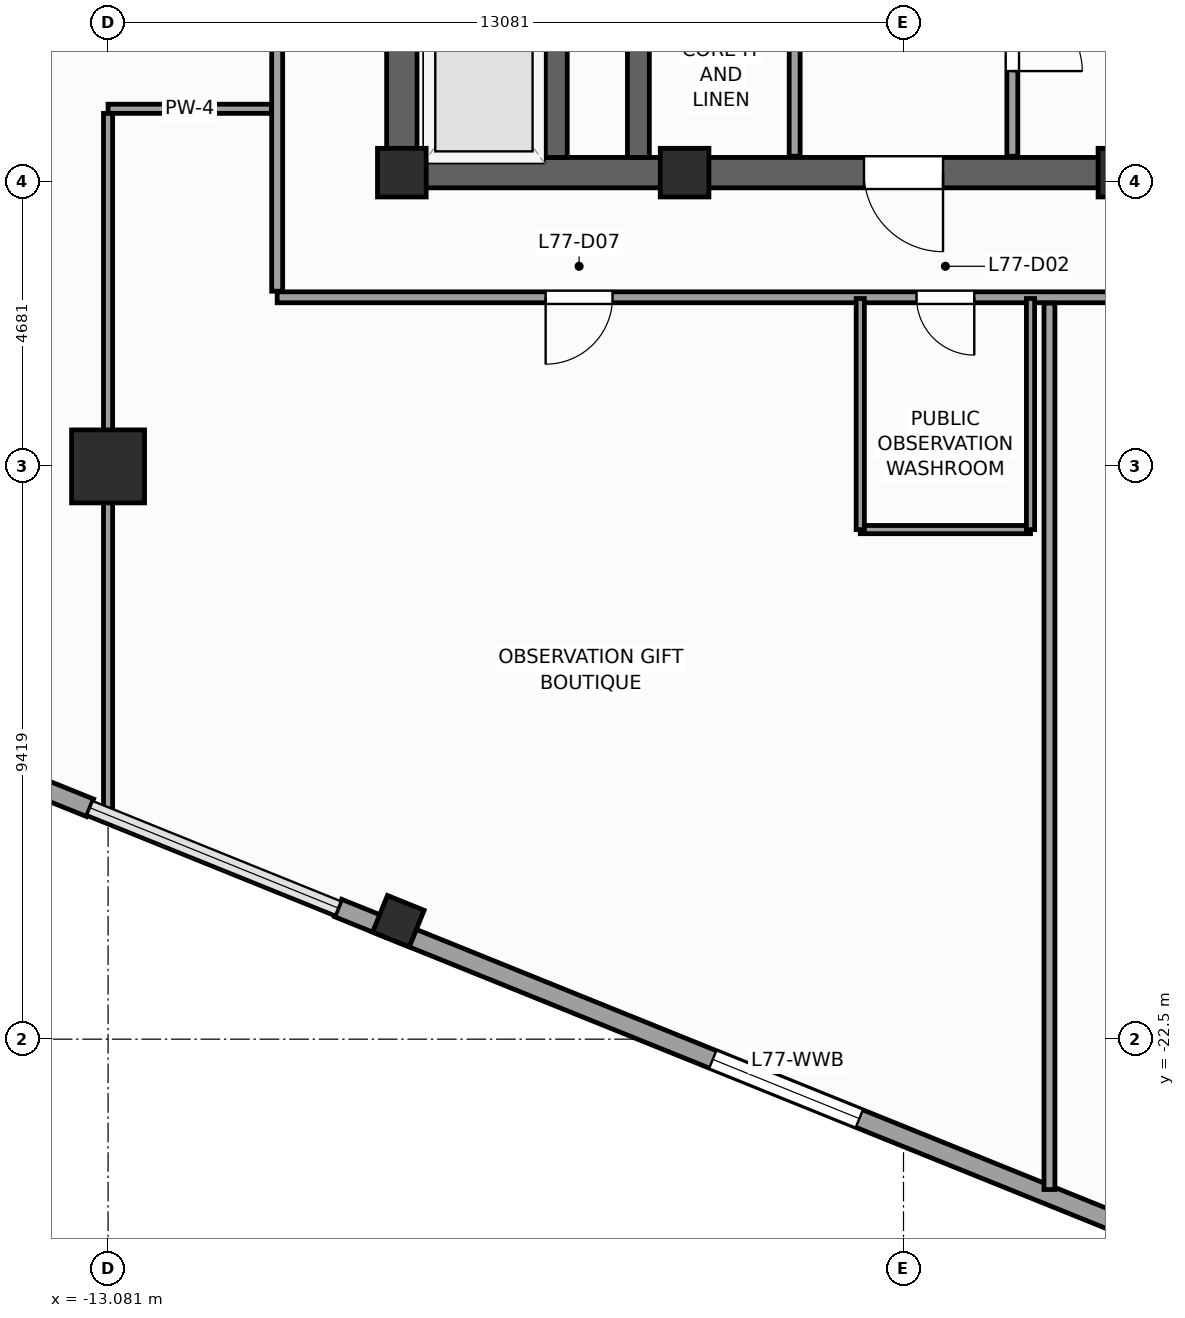
"""IFC4 building model, lengths in metres.
Left out: names, types, materials, properties, quantities, classifications, styles, units other than length and angle.
Written with IfcOpenShell. Run it as: python <this file> out.ifc"""

import sys

from ifc_helpers import new_model, si_unit, direction, frame, frame_2d, origin, origin_2d, place, context, subcontext, project, spatial, rectangle, extrude, source, transform, mapped, element, fill, save


model = new_model("IFC4")
c1 = context("Model", 3, precision=1e-05, world=origin(), true_north=direction((0.0, 1.0)))
c2 = subcontext(c1, "Body", "Model", "MODEL_VIEW")
j1 = project(units=[si_unit("LENGTHUNIT", "METRE"), si_unit("PLANEANGLEUNIT", "RADIAN")], contexts=[c1])
p1 = place(None, origin())
s1 = spatial("IfcSite", under=j1, at=p1, CompositionType="ELEMENT")
p2 = place(p1, origin())
s2 = spatial("IfcBuilding", under=s1, at=p2, CompositionType="ELEMENT")
p3 = place(p2, frame((0.0, 0.0, 312.0)))
s3 = spatial("IfcBuildingStorey", under=s2, at=p3, CompositionType="ELEMENT", Elevation=312.0)
p4 = place(p3, frame((-8.5, -8.25, 0.0), z_axis=(0.0, 0.0, 1.0), x_axis=(1.0, 0.0, 0.0)))
e1 = element("IfcWall", 1, at=p4, inside=s3, PredefinedType="SHEAR", context=c2, shape_type="SweptSolid", body=[
    extrude(rectangle(XDim=17.0, YDim=0.5, at=frame_2d((8.5, 0.0))), origin(), (0.0, 0.0, 1.0), 4.8),
])
p5 = place(p4, frame((7.85, 0.0, 0.0)))
e2 = element("IfcOpeningElement", 2, at=p5, cuts=e1, PredefinedType="OPENING", context=c2, shape_type="SweptSolid", body=[
    extrude(rectangle(XDim=1.3, YDim=2.2, at=frame_2d((0.65, 1.1))), frame((0.0, 0.26, 0.0), z_axis=(0.0, -1.0, 0.0), x_axis=(1.0, 0.0, 0.0)), (0.0, 0.0, 1.0), 0.52),
])
p6 = place(p3, frame((-8.25, -8.0, 0.0), z_axis=(0.0, 0.0, 1.0), x_axis=(0.0, 1.0, 0.0)))
e3 = element("IfcWall", 3, at=p6, inside=s3, PredefinedType="SHEAR", context=c2, shape_type="SweptSolid", body=[
    extrude(rectangle(XDim=16.0, YDim=0.5, at=frame_2d((8.0, 0.0))), origin(), (0.0, 0.0, 1.0), 4.8),
])
p7 = place(p6, frame((4.69, 0.0, 0.0)))
e4 = element("IfcOpeningElement", 4, at=p7, cuts=e3, PredefinedType="OPENING", context=c2, shape_type="SweptSolid", body=[
    extrude(rectangle(XDim=1.3, YDim=2.2, at=frame_2d((0.65, 1.1))), frame((0.0, 0.26, 0.0), z_axis=(0.0, -1.0, 0.0), x_axis=(1.0, 0.0, 0.0)), (0.0, 0.0, 1.0), 0.52),
])
p8 = place(p3, frame((-4.36, -8.0, 0.0), z_axis=(0.0, 0.0, 1.0), x_axis=(0.0, 1.0, 0.0)))
e5 = element("IfcWall", 5, at=p8, inside=s3, PredefinedType="SHEAR", context=c2, shape_type="SweptSolid", body=[
    extrude(rectangle(XDim=16.0, YDim=0.36, at=frame_2d((8.0, 0.0))), origin(), (0.0, 0.0, 1.0), 4.8),
])
p9 = place(p3, frame((-5.71, -8.0, 0.0), z_axis=(0.0, 0.0, 1.0), x_axis=(0.0, 1.0, 0.0)))
e6 = element("IfcWall", 6, at=p9, inside=s3, PredefinedType="SHEAR", context=c2, shape_type="SweptSolid", body=[
    extrude(rectangle(XDim=2.54, YDim=0.36, at=frame_2d((1.27, 0.0))), origin(), (0.0, 0.0, 1.0), 4.8),
])
m1 = source(origin(), c2, "Body", "SweptSolid", [
    extrude(rectangle(XDim=0.8, YDim=0.8, at=origin_2d()), origin(), (0.0, 0.0, 1.0), 4.8),
])
for number, where, z_axis, x_axis in (
    (7, (-8.25, -8.25, 0.0), (0.0, 0.0, 1.0), (1.0, 0.0, 0.0)),
    (8, (-3.6, -8.25, 0.0), (0.0, 0.0, 1.0), (1.0, 0.0, 0.0)),
    (9, (3.6, -8.25, 0.0), (0.0, 0.0, 1.0), (1.0, 0.0, 0.0)),
):
    element("IfcColumn", number, at=place(p3, frame(where, z_axis=z_axis, x_axis=x_axis)), inside=s3, PredefinedType="PILASTER", context=c2, shape_type="MappedRepresentation", body=[
        mapped(m1, transform((0.0, 0.0, 0.0), scale=1.0)),
    ])
m2 = source(origin(), c2, "Body", "SweptSolid", [
    extrude(rectangle(XDim=1.2, YDim=1.2, at=origin_2d()), origin(), (0.0, 0.0, 1.0), 4.8),
])
p10 = place(p3, frame((-13.081, -13.081, 0.0), z_axis=(0.0, 0.0, 1.0), x_axis=(1.0, 0.0, 0.0)))
e10 = element("IfcColumn", 10, at=p10, inside=s3, PredefinedType="COLUMN", context=c2, shape_type="MappedRepresentation", body=[
    mapped(m2, transform((0.0, 0.0, 0.0), scale=1.0)),
])
m3 = source(origin(), c2, "Body", "SweptSolid", [
    extrude(rectangle(XDim=0.65, YDim=0.65, at=origin_2d()), origin(), (0.0, 0.0, 1.0), 4.8),
])
p11 = place(p3, frame((-8.307, -20.56, 0.0), z_axis=(0.0, 0.0, 1.0), x_axis=(0.374606593416, 0.927183854567, 0.0)))
e11 = element("IfcColumn", 11, at=p11, inside=s3, PredefinedType="COLUMN", context=c2, shape_type="MappedRepresentation", body=[
    mapped(m3, transform((0.0, 0.0, 0.0), scale=1.0)),
])
p12 = place(p3, frame((-23.813, -14.479, 0.0), z_axis=(0.0, 0.0, 1.0), x_axis=(0.927178527544, -0.374619777991, 0.0)))
e12 = element("IfcWall", 12, at=p12, inside=s3, PredefinedType="STANDARD", context=c2, shape_type="SweptSolid", body=[
    extrude(rectangle(XDim=11.255, YDim=0.31, at=frame_2d((5.627, 0.0))), origin(), (0.0, 0.0, 1.0), 3.95),
])
p13 = place(p3, frame((-9.298, -20.343, 0.0), z_axis=(0.0, 0.0, 1.0), x_axis=(0.927183654967, -0.374607087443, 0.0)))
e13 = element("IfcWall", 13, at=p13, inside=s3, PredefinedType="STANDARD", context=c2, shape_type="SweptSolid", body=[
    extrude(rectangle(XDim=17.655, YDim=0.31, at=frame_2d((8.828, 0.0))), origin(), (0.0, 0.0, 1.0), 3.95),
])
p14 = place(p13, frame((6.645, 0.0, 0.65)))
e14 = element("IfcOpeningElement", 14, at=p14, cuts=e13, PredefinedType="OPENING", context=c2, shape_type="SweptSolid", body=[
    extrude(rectangle(XDim=2.6, YDim=3.0, at=frame_2d((1.3, 1.5))), frame((0.0, 0.165, 0.0), z_axis=(0.0, -1.0, 0.0), x_axis=(1.0, 0.0, 0.0)), (0.0, 0.0, 1.0), 0.33),
])
p15 = place(p3, frame((-1.79, -7.98, 0.0), z_axis=(0.0, 0.0, 1.0), x_axis=(0.0, 1.0, 0.0)))
e15 = element("IfcWall", 15, at=p15, inside=s3, PredefinedType="PARTITIONING", context=c2, shape_type="SweptSolid", body=[
    extrude(rectangle(XDim=12.38, YDim=0.18, at=frame_2d((6.19, 0.0))), origin(), (0.0, 0.0, 1.0), 4.55),
])
p16 = place(p15, frame((8.8, 0.0, 0.0)))
e16 = element("IfcOpeningElement", 16, at=p16, cuts=e15, PredefinedType="OPENING", context=c2, shape_type="SweptSolid", body=[
    extrude(rectangle(XDim=1.1, YDim=2.2, at=frame_2d((0.55, 1.1))), frame((0.0, 0.1, 0.0), z_axis=(0.0, -1.0, 0.0), x_axis=(1.0, 0.0, 0.0)), (0.0, 0.0, 1.0), 0.2),
])
p17 = place(p15, frame((10.86, 0.0, 0.0)))
e17 = element("IfcOpeningElement", 17, at=p17, cuts=e15, PredefinedType="OPENING", context=c2, shape_type="SweptSolid", body=[
    extrude(rectangle(XDim=1.1, YDim=2.2, at=frame_2d((0.55, 1.1))), frame((0.0, 0.1, 0.0), z_axis=(0.0, -1.0, 0.0), x_axis=(1.0, 0.0, 0.0)), (0.0, 0.0, 1.0), 0.2),
])
p18 = place(p15, frame((3.5, 0.0, 0.0)))
e18 = element("IfcOpeningElement", 18, at=p18, cuts=e15, PredefinedType="OPENING", context=c2, shape_type="SweptSolid", body=[
    extrude(rectangle(XDim=1.15, YDim=2.25, at=frame_2d((0.575, 1.125))), frame((0.0, 0.1, 0.0), z_axis=(0.0, -1.0, 0.0), x_axis=(1.0, 0.0, 0.0)), (0.0, 0.0, 1.0), 0.2),
])
p19 = place(p3, frame((1.79, -7.98, 0.0), z_axis=(0.0, 0.0, 1.0), x_axis=(0.0, 1.0, 0.0)))
e19 = element("IfcWall", 19, at=p19, inside=s3, PredefinedType="PARTITIONING", context=c2, shape_type="SweptSolid", body=[
    extrude(rectangle(XDim=12.38, YDim=0.18, at=frame_2d((6.19, 0.0))), origin(), (0.0, 0.0, 1.0), 4.55),
])
p20 = place(p19, frame((8.8, 0.0, 0.0)))
e20 = element("IfcOpeningElement", 20, at=p20, cuts=e19, PredefinedType="OPENING", context=c2, shape_type="SweptSolid", body=[
    extrude(rectangle(XDim=1.1, YDim=2.2, at=frame_2d((0.55, 1.1))), frame((0.0, 0.1, 0.0), z_axis=(0.0, -1.0, 0.0), x_axis=(1.0, 0.0, 0.0)), (0.0, 0.0, 1.0), 0.2),
])
p21 = place(p19, frame((10.86, 0.0, 0.0)))
e21 = element("IfcOpeningElement", 21, at=p21, cuts=e19, PredefinedType="OPENING", context=c2, shape_type="SweptSolid", body=[
    extrude(rectangle(XDim=1.1, YDim=2.2, at=frame_2d((0.55, 1.1))), frame((0.0, 0.1, 0.0), z_axis=(0.0, -1.0, 0.0), x_axis=(1.0, 0.0, 0.0)), (0.0, 0.0, 1.0), 0.2),
])
p22 = place(p19, frame((1.4, 0.0, 0.0)))
e22 = element("IfcOpeningElement", 22, at=p22, cuts=e19, PredefinedType="OPENING", context=c2, shape_type="SweptSolid", body=[
    extrude(rectangle(XDim=1.15, YDim=2.25, at=frame_2d((0.575, 1.125))), frame((0.0, 0.1, 0.0), z_axis=(0.0, -1.0, 0.0), x_axis=(1.0, 0.0, 0.0)), (0.0, 0.0, 1.0), 0.2),
])
p23 = place(p19, frame((5.6, 0.0, 0.0)))
e23 = element("IfcOpeningElement", 23, at=p23, cuts=e19, PredefinedType="OPENING", context=c2, shape_type="SweptSolid", body=[
    extrude(rectangle(XDim=1.15, YDim=2.25, at=frame_2d((0.575, 1.125))), frame((0.0, 0.1, 0.0), z_axis=(0.0, -1.0, 0.0), x_axis=(1.0, 0.0, 0.0)), (0.0, 0.0, 1.0), 0.2),
])
p24 = place(p3, frame((-10.3, -10.3, 0.0), z_axis=(0.0, 0.0, 1.0), x_axis=(1.0, 0.0, 0.0)))
e24 = element("IfcWall", 24, at=p24, inside=s3, PredefinedType="PARTITIONING", context=c2, shape_type="SweptSolid", body=[
    extrude(rectangle(XDim=21.2, YDim=0.18, at=frame_2d((10.6, 0.0))), origin(), (0.0, 0.0, 1.0), 4.55),
])
p25 = place(p24, frame((10.514, 0.0, 0.0)))
e25 = element("IfcOpeningElement", 25, at=p25, cuts=e24, PredefinedType="OPENING", context=c2, shape_type="SweptSolid", body=[
    extrude(rectangle(XDim=0.95, YDim=2.1, at=frame_2d((0.475, 1.05))), frame((0.0, 0.1, 0.0), z_axis=(0.0, -1.0, 0.0), x_axis=(1.0, 0.0, 0.0)), (0.0, 0.0, 1.0), 0.2),
])
p26 = place(p24, frame((16.236, 0.0, 0.0)))
e26 = element("IfcOpeningElement", 26, at=p26, cuts=e24, PredefinedType="OPENING", context=c2, shape_type="SweptSolid", body=[
    extrude(rectangle(XDim=1.1, YDim=2.2, at=frame_2d((0.55, 1.1))), frame((0.0, 0.1, 0.0), z_axis=(0.0, -1.0, 0.0), x_axis=(1.0, 0.0, 0.0)), (0.0, 0.0, 1.0), 0.2),
])
p27 = place(p24, frame((4.415, 0.0, 0.0)))
e27 = element("IfcOpeningElement", 27, at=p27, cuts=e24, PredefinedType="OPENING", context=c2, shape_type="SweptSolid", body=[
    extrude(rectangle(XDim=1.1, YDim=2.2, at=frame_2d((0.55, 1.1))), frame((0.0, 0.1, 0.0), z_axis=(0.0, -1.0, 0.0), x_axis=(1.0, 0.0, 0.0)), (0.0, 0.0, 1.0), 0.2),
])
p28 = place(p3, frame((-10.3, -10.2, 0.0), z_axis=(0.0, 0.0, 1.0), x_axis=(0.0, 1.0, 0.0)))
e28 = element("IfcWall", 28, at=p28, inside=s3, PredefinedType="PARTITIONING", context=c2, shape_type="SweptSolid", body=[
    extrude(rectangle(XDim=21.0, YDim=0.18, at=frame_2d((10.5, 0.0))), origin(), (0.0, 0.0, 1.0), 4.55),
])
p29 = place(p28, frame((6.8, 0.0, 0.0)))
e29 = element("IfcOpeningElement", 29, at=p29, cuts=e28, PredefinedType="OPENING", context=c2, shape_type="SweptSolid", body=[
    extrude(rectangle(XDim=1.1, YDim=2.2, at=frame_2d((0.55, 1.1))), frame((0.0, 0.1, 0.0), z_axis=(0.0, -1.0, 0.0), x_axis=(1.0, 0.0, 0.0)), (0.0, 0.0, 1.0), 0.2),
])
p30 = place(p3, frame((2.4, -10.395, 0.0), z_axis=(0.0, 0.0, 1.0), x_axis=(0.0, -1.0, 0.0)))
e30 = element("IfcWall", 30, at=p30, inside=s3, PredefinedType="PARTITIONING", context=c2, shape_type="SweptSolid", body=[
    extrude(rectangle(XDim=14.577, YDim=0.18, at=frame_2d((7.289, 0.0))), origin(), (0.0, 0.0, 1.0), 4.22),
])
p31 = place(p3, frame((-10.395, -7.2, 0.0), z_axis=(0.0, 0.0, 1.0), x_axis=(-1.0, 0.0, 0.0)))
e31 = element("IfcWall", 31, at=p31, inside=s3, PredefinedType="PARTITIONING", context=c2, shape_type="SweptSolid", body=[
    extrude(rectangle(XDim=2.686, YDim=0.15, at=frame_2d((1.343, 0.0))), origin(), (0.0, 0.0, 1.0), 4.55),
])
p32 = place(p3, frame((-13.081, -7.275, 0.0), z_axis=(0.0, 0.0, 1.0), x_axis=(0.0, -1.0, 0.0)))
e32 = element("IfcWall", 32, at=p32, inside=s3, PredefinedType="PARTITIONING", context=c2, shape_type="SweptSolid", body=[
    extrude(rectangle(XDim=11.443, YDim=0.15, at=frame_2d((5.721, 0.0))), origin(), (0.0, 0.0, 1.0), 3.65),
])
p33 = place(p3, frame((-0.711, -14.12, 0.0), z_axis=(0.0, 0.0, 1.0), x_axis=(1.0, 0.0, 0.0)))
e33 = element("IfcWall", 33, at=p33, inside=s3, PredefinedType="PARTITIONING", context=c2, shape_type="SweptSolid", body=[
    extrude(rectangle(XDim=2.8, YDim=0.135, at=frame_2d((1.4, 0.0))), origin(), (0.0, 0.0, 1.0), 4.55),
])
for number, where, z_axis, x_axis in (
    (34, (2.089, -14.12, 0.0), (0.0, 0.0, 1.0), (0.0, 1.0, 0.0)),
    (35, (-0.711, -14.12, 0.0), (0.0, 0.0, 1.0), (0.0, 1.0, 0.0)),
):
    element("IfcWall", number, at=place(p3, frame(where, z_axis=z_axis, x_axis=x_axis)), inside=s3, PredefinedType="PARTITIONING", context=c2, shape_type="SweptSolid", body=[
        extrude(rectangle(XDim=3.8, YDim=0.135, at=frame_2d((1.9, 0.0))), origin(), (0.0, 0.0, 1.0), 4.55),
    ])
m4 = source(origin(), c2, "Body", "SweptSolid", [
    extrude(rectangle(XDim=2.6, YDim=3.0, at=frame_2d((1.3, 1.5))), frame((0.0, 0.03, 0.0), z_axis=(0.0, -1.0, 0.0), x_axis=(1.0, 0.0, 0.0)), (0.0, 0.0, 1.0), 0.06),
])
p34 = place(p14, origin())
e36 = element("IfcWindow", 36, at=p34, inside=s3, PartitioningType="SINGLE_PANEL", PredefinedType="WINDOW", context=c2, shape_type="MappedRepresentation", body=[
    mapped(m4, transform((0.0, 0.0, 0.0), scale=1.0)),
])
fill(e14, e36)
m5 = source(origin(), c2, "Body", "SweptSolid", [
    extrude(rectangle(XDim=1.3, YDim=2.2, at=frame_2d((0.65, 1.1))), frame((0.0, 0.025, 0.0), z_axis=(0.0, -1.0, 0.0), x_axis=(1.0, 0.0, 0.0)), (0.0, 0.0, 1.0), 0.05),
])
p35 = place(p5, frame((1.3, 0.0, 0.0), z_axis=(0.0, 0.0, 1.0), x_axis=(-1.0, 0.0, 0.0)))
e37 = element("IfcDoor", 37, at=p35, inside=s3, OperationType="SINGLE_SWING_RIGHT", PredefinedType="DOOR", context=c2, shape_type="MappedRepresentation", body=[
    mapped(m5, transform((0.0, 0.0, 0.0), scale=1.0)),
])
fill(e2, e37)
m6 = source(origin(), c2, "Body", "SweptSolid", [
    extrude(rectangle(XDim=1.15, YDim=2.25, at=frame_2d((0.575, 1.125))), frame((0.0, 0.025, 0.0), z_axis=(0.0, -1.0, 0.0), x_axis=(1.0, 0.0, 0.0)), (0.0, 0.0, 1.0), 0.05),
])
p36 = place(p22, frame((1.15, 0.0, 0.0), z_axis=(0.0, 0.0, 1.0), x_axis=(-1.0, 0.0, 0.0)))
e38 = element("IfcDoor", 38, at=p36, inside=s3, OperationType="SINGLE_SWING_LEFT", PredefinedType="DOOR", context=c2, shape_type="MappedRepresentation", body=[
    mapped(m6, transform((0.0, 0.0, 0.0), scale=1.0)),
])
fill(e22, e38)
m7 = source(origin(), c2, "Body", "SweptSolid", [
    extrude(rectangle(XDim=0.95, YDim=2.1, at=frame_2d((0.475, 1.05))), frame((0.0, 0.025, 0.0), z_axis=(0.0, -1.0, 0.0), x_axis=(1.0, 0.0, 0.0)), (0.0, 0.0, 1.0), 0.05),
])
p37 = place(p25, frame((0.95, 0.0, 0.0), z_axis=(0.0, 0.0, 1.0), x_axis=(-1.0, 0.0, 0.0)))
e39 = element("IfcDoor", 39, at=p37, inside=s3, OperationType="SINGLE_SWING_RIGHT", PredefinedType="DOOR", context=c2, shape_type="MappedRepresentation", body=[
    mapped(m7, transform((0.0, 0.0, 0.0), scale=1.0)),
])
fill(e25, e39)
m8 = source(origin(), c2, "Body", "SweptSolid", [
    extrude(rectangle(XDim=1.1, YDim=2.2, at=frame_2d((0.55, 1.1))), frame((0.0, 0.025, 0.0), z_axis=(0.0, -1.0, 0.0), x_axis=(1.0, 0.0, 0.0)), (0.0, 0.0, 1.0), 0.05),
])
p38 = place(p27, frame((1.1, 0.0, 0.0), z_axis=(0.0, 0.0, 1.0), x_axis=(-1.0, 0.0, 0.0)))
e40 = element("IfcDoor", 40, at=p38, inside=s3, OperationType="SINGLE_SWING_LEFT", PredefinedType="DOOR", context=c2, shape_type="MappedRepresentation", body=[
    mapped(m8, transform((0.0, 0.0, 0.0), scale=1.0)),
])
fill(e27, e40)
save(model, sys.argv[1])
